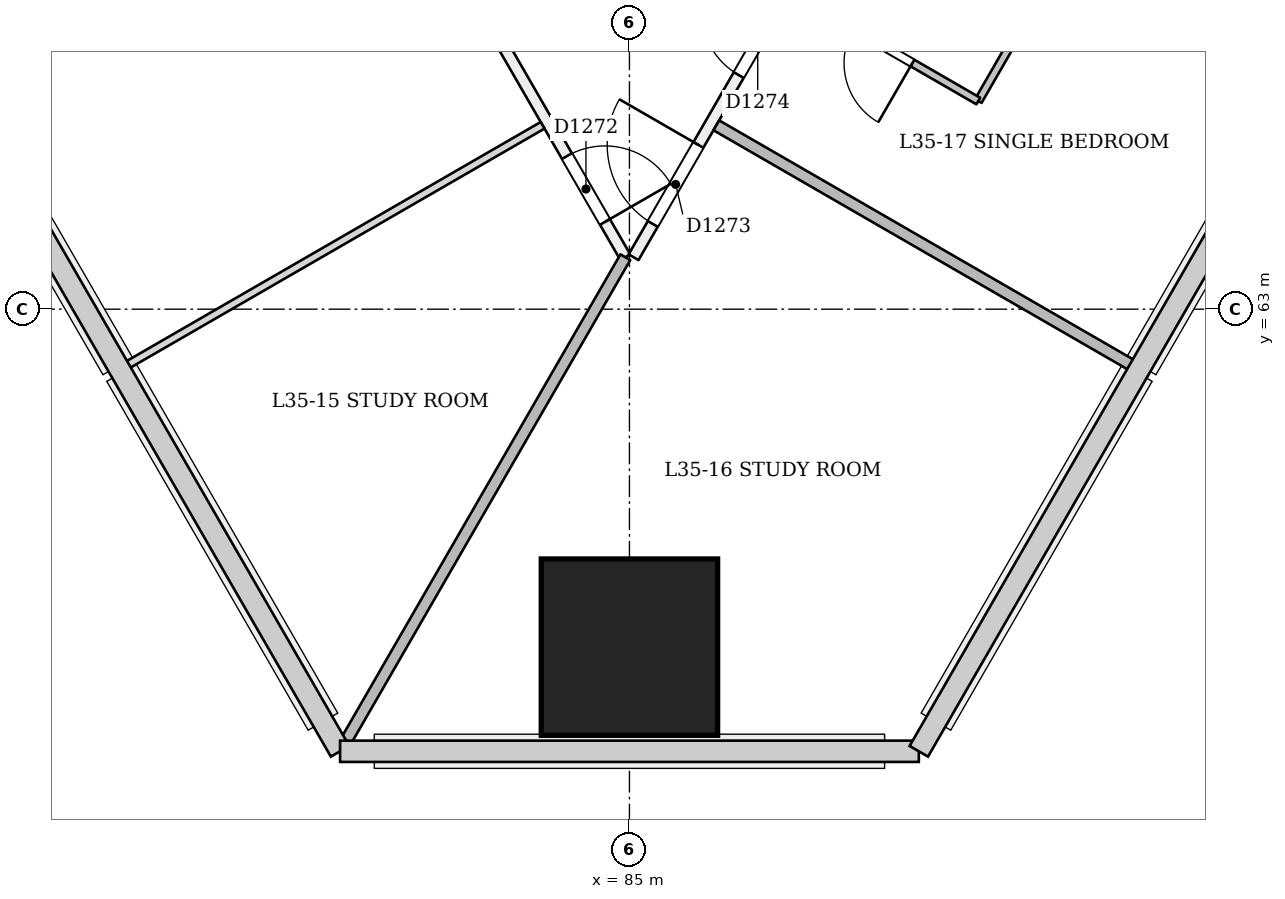
"""IFC4 building model, lengths in metres.
Left out: names, types, materials, properties, quantities, classifications, styles, units other than length and angle.
Written with IfcOpenShell. Run it as: python <this file> out.ifc"""

import sys

from ifc_helpers import new_model, si_unit, direction, frame, frame_2d, origin, origin_2d, place, context, subcontext, project, spatial, rectangle, extrude, element, fill, save


model = new_model("IFC4")
c1 = context("Model", 3, precision=1e-05, world=origin(), true_north=direction((0.0, 1.0)))
c2 = subcontext(c1, "Body", "Model", "MODEL_VIEW")
j1 = project(units=[si_unit("LENGTHUNIT", "METRE"), si_unit("PLANEANGLEUNIT", "RADIAN")], contexts=[c1])
p1 = place(None, origin())
s1 = spatial("IfcSite", under=j1, at=p1, CompositionType="ELEMENT")
p2 = place(p1, origin())
s2 = spatial("IfcBuilding", under=s1, at=p2, CompositionType="ELEMENT")
p3 = place(p2, frame((0.0, 0.0, 138.6)))
s3 = spatial("IfcBuildingStorey", under=s2, at=p3, CompositionType="ELEMENT", Elevation=138.6)
p4 = place(p3, frame((85.0, 58.484, 0.0), z_axis=(0.0, 0.058360852261, 0.998295552892), x_axis=(-1.0, 0.0, 0.0)))
e1 = element("IfcColumn", 1, at=p4, inside=s3, PredefinedType="COLUMN", context=c2, shape_type="SweptSolid", body=[
    extrude(rectangle(XDim=2.32, YDim=2.32, at=origin_2d()), origin(), (0.0, 0.0, 1.0), 3.606),
])
p5 = place(p3, frame((64.899, 98.406, 0.0), z_axis=(0.0, 0.0, 1.0), x_axis=(0.499995137693, -0.86602821102, 0.0)))
e2 = element("IfcWall", 2, at=p5, inside=s3, PredefinedType="PARTITIONING", context=c2, shape_type="SweptSolid", body=[
    extrude(rectangle(XDim=40.094, YDim=0.15, at=frame_2d((20.047, 0.0))), origin(), (0.0, 0.0, 1.0), 2.75),
])
p6 = place(p5, frame((0.2, 0.0, 0.0)))
e3 = element("IfcOpeningElement", 3, at=p6, cuts=e2, PredefinedType="OPENING", context=c2, shape_type="SweptSolid", body=[
    extrude(rectangle(XDim=1.2, YDim=2.1, at=frame_2d((0.6, 1.05))), frame((0.0, 0.085, 0.0), z_axis=(0.0, -1.0, 0.0), x_axis=(1.0, 0.0, 0.0)), (0.0, 0.0, 1.0), 0.171),
])
p7 = place(p5, frame((9.442, 0.0, 0.0)))
e4 = element("IfcOpeningElement", 4, at=p7, cuts=e2, PredefinedType="OPENING", context=c2, shape_type="SweptSolid", body=[
    extrude(rectangle(XDim=1.0, YDim=2.1, at=frame_2d((0.5, 1.05))), frame((0.0, 0.085, 0.0), z_axis=(0.0, -1.0, 0.0), x_axis=(1.0, 0.0, 0.0)), (0.0, 0.0, 1.0), 0.171),
])
p8 = place(p5, frame((11.652, 0.0, 0.0)))
e5 = element("IfcOpeningElement", 5, at=p8, cuts=e2, PredefinedType="OPENING", context=c2, shape_type="SweptSolid", body=[
    extrude(rectangle(XDim=1.0, YDim=2.1, at=frame_2d((0.5, 1.05))), frame((0.0, 0.085, 0.0), z_axis=(0.0, -1.0, 0.0), x_axis=(1.0, 0.0, 0.0)), (0.0, 0.0, 1.0), 0.171),
])
p9 = place(p5, frame((19.447, 0.0, 0.0)))
e6 = element("IfcOpeningElement", 6, at=p9, cuts=e2, PredefinedType="OPENING", context=c2, shape_type="SweptSolid", body=[
    extrude(rectangle(XDim=1.2, YDim=2.1, at=frame_2d((0.6, 1.05))), frame((0.0, 0.085, 0.0), z_axis=(0.0, -1.0, 0.0), x_axis=(1.0, 0.0, 0.0)), (0.0, 0.0, 1.0), 0.171),
])
p10 = place(p5, frame((27.327, 0.0, 0.0)))
e7 = element("IfcOpeningElement", 7, at=p10, cuts=e2, PredefinedType="OPENING", context=c2, shape_type="SweptSolid", body=[
    extrude(rectangle(XDim=1.0, YDim=2.1, at=frame_2d((0.5, 1.05))), frame((0.0, 0.085, 0.0), z_axis=(0.0, -1.0, 0.0), x_axis=(1.0, 0.0, 0.0)), (0.0, 0.0, 1.0), 0.171),
])
p11 = place(p5, frame((31.847, 0.0, 0.0)))
e8 = element("IfcOpeningElement", 8, at=p11, cuts=e2, PredefinedType="OPENING", context=c2, shape_type="SweptSolid", body=[
    extrude(rectangle(XDim=1.2, YDim=2.1, at=frame_2d((0.6, 1.05))), frame((0.0, 0.085, 0.0), z_axis=(0.0, -1.0, 0.0), x_axis=(1.0, 0.0, 0.0)), (0.0, 0.0, 1.0), 0.171),
])
p12 = place(p5, frame((38.558, 0.0, 0.0)))
e9 = element("IfcOpeningElement", 9, at=p12, cuts=e2, PredefinedType="OPENING", context=c2, shape_type="SweptSolid", body=[
    extrude(rectangle(XDim=1.0, YDim=2.1, at=frame_2d((0.5, 1.05))), frame((0.0, 0.085, 0.0), z_axis=(0.0, -1.0, 0.0), x_axis=(1.0, 0.0, 0.0)), (0.0, 0.0, 1.0), 0.171),
])
p13 = place(p3, frame((85.054, 63.684, 0.0), z_axis=(0.0, 0.0, 1.0), x_axis=(0.499999704591, 0.866025574339, 0.0)))
e10 = element("IfcWall", 10, at=p13, inside=s3, PredefinedType="PARTITIONING", context=c2, shape_type="SweptSolid", body=[
    extrude(rectangle(XDim=40.094, YDim=0.15, at=frame_2d((20.047, 0.0))), origin(), (0.0, 0.0, 1.0), 2.75),
])
p14 = place(p13, frame((0.506, 0.0, 0.0)))
e11 = element("IfcOpeningElement", 11, at=p14, cuts=e10, PredefinedType="OPENING", context=c2, shape_type="SweptSolid", body=[
    extrude(rectangle(XDim=1.2, YDim=2.1, at=frame_2d((0.6, 1.05))), frame((0.0, 0.085, 0.0), z_axis=(0.0, -1.0, 0.0), x_axis=(1.0, 0.0, 0.0)), (0.0, 0.0, 1.0), 0.171),
])
p15 = place(p13, frame((2.767, 0.0, 0.0)))
e12 = element("IfcOpeningElement", 12, at=p15, cuts=e10, PredefinedType="OPENING", context=c2, shape_type="SweptSolid", body=[
    extrude(rectangle(XDim=1.0, YDim=2.1, at=frame_2d((0.5, 1.05))), frame((0.0, 0.085, 0.0), z_axis=(0.0, -1.0, 0.0), x_axis=(1.0, 0.0, 0.0)), (0.0, 0.0, 1.0), 0.171),
])
p16 = place(p13, frame((8.297, 0.0, 0.0)))
e13 = element("IfcOpeningElement", 13, at=p16, cuts=e10, PredefinedType="OPENING", context=c2, shape_type="SweptSolid", body=[
    extrude(rectangle(XDim=1.0, YDim=2.1, at=frame_2d((0.5, 1.05))), frame((0.0, 0.085, 0.0), z_axis=(0.0, -1.0, 0.0), x_axis=(1.0, 0.0, 0.0)), (0.0, 0.0, 1.0), 0.171),
])
p17 = place(p13, frame((11.652, 0.0, 0.0)))
e14 = element("IfcOpeningElement", 14, at=p17, cuts=e10, PredefinedType="OPENING", context=c2, shape_type="SweptSolid", body=[
    extrude(rectangle(XDim=1.0, YDim=2.1, at=frame_2d((0.5, 1.05))), frame((0.0, 0.085, 0.0), z_axis=(0.0, -1.0, 0.0), x_axis=(1.0, 0.0, 0.0)), (0.0, 0.0, 1.0), 0.171),
])
p18 = place(p13, frame((18.327, 0.0, 0.0)))
e15 = element("IfcOpeningElement", 15, at=p18, cuts=e10, PredefinedType="OPENING", context=c2, shape_type="SweptSolid", body=[
    extrude(rectangle(XDim=1.0, YDim=2.1, at=frame_2d((0.5, 1.05))), frame((0.0, 0.085, 0.0), z_axis=(0.0, -1.0, 0.0), x_axis=(1.0, 0.0, 0.0)), (0.0, 0.0, 1.0), 0.171),
])
p19 = place(p13, frame((20.767, 0.0, 0.0)))
e16 = element("IfcOpeningElement", 16, at=p19, cuts=e10, PredefinedType="OPENING", context=c2, shape_type="SweptSolid", body=[
    extrude(rectangle(XDim=1.0, YDim=2.1, at=frame_2d((0.5, 1.05))), frame((0.0, 0.085, 0.0), z_axis=(0.0, -1.0, 0.0), x_axis=(1.0, 0.0, 0.0)), (0.0, 0.0, 1.0), 0.171),
])
p20 = place(p13, frame((26.297, 0.0, 0.0)))
e17 = element("IfcOpeningElement", 17, at=p20, cuts=e10, PredefinedType="OPENING", context=c2, shape_type="SweptSolid", body=[
    extrude(rectangle(XDim=1.0, YDim=2.1, at=frame_2d((0.5, 1.05))), frame((0.0, 0.085, 0.0), z_axis=(0.0, -1.0, 0.0), x_axis=(1.0, 0.0, 0.0)), (0.0, 0.0, 1.0), 0.171),
])
p21 = place(p13, frame((31.847, 0.0, 0.0)))
e18 = element("IfcOpeningElement", 18, at=p21, cuts=e10, PredefinedType="OPENING", context=c2, shape_type="SweptSolid", body=[
    extrude(rectangle(XDim=1.2, YDim=2.1, at=frame_2d((0.6, 1.05))), frame((0.0, 0.085, 0.0), z_axis=(0.0, -1.0, 0.0), x_axis=(1.0, 0.0, 0.0)), (0.0, 0.0, 1.0), 0.171),
])
p22 = place(p13, frame((38.694, 0.0, 0.0)))
e19 = element("IfcOpeningElement", 19, at=p22, cuts=e10, PredefinedType="OPENING", context=c2, shape_type="SweptSolid", body=[
    extrude(rectangle(XDim=1.2, YDim=2.1, at=frame_2d((0.6, 1.05))), frame((0.0, 0.085, 0.0), z_axis=(0.0, -1.0, 0.0), x_axis=(1.0, 0.0, 0.0)), (0.0, 0.0, 1.0), 0.171),
])
p23 = place(p3, frame((78.362, 62.246, 0.0), z_axis=(0.0, 0.0, 1.0), x_axis=(0.866025401434, 0.500000004071, 0.0)))
e20 = element("IfcWall", 20, at=p23, inside=s3, PredefinedType="PARTITIONING", context=c2, shape_type="SweptSolid", body=[
    extrude(rectangle(XDim=6.345, YDim=0.1, at=frame_2d((3.173, 0.0))), origin(), (0.0, 0.0, 1.0), 2.65),
])
p24 = place(p3, frame((81.236, 57.258, 0.0), z_axis=(0.0, 0.0, 1.0), x_axis=(0.500007295633, 0.866021191608, 0.0)))
e21 = element("IfcWall", 21, at=p24, inside=s3, PredefinedType="PARTITIONING", context=c2, shape_type="SweptSolid", body=[
    extrude(rectangle(XDim=7.419, YDim=0.15, at=frame_2d((3.71, 0.0))), origin(), (0.0, 0.0, 1.0), 2.65),
])
p25 = place(p3, frame((91.638, 62.246, 0.0), z_axis=(0.0, 0.0, 1.0), x_axis=(-0.866025401434, 0.500000004071, 0.0)))
e22 = element("IfcWall", 22, at=p25, inside=s3, PredefinedType="PARTITIONING", context=c2, shape_type="SweptSolid", body=[
    extrude(rectangle(XDim=6.345, YDim=0.15, at=frame_2d((3.173, 0.0))), origin(), (0.0, 0.0, 1.0), 2.65),
])
p26 = place(p3, frame((90.802, 67.839, 0.0), z_axis=(0.0, 0.0, 1.0), x_axis=(-0.500047793048, -0.865997808697, 0.0)))
e23 = element("IfcWall", 23, at=p26, inside=s3, PredefinedType="PARTITIONING", context=c2, shape_type="SweptSolid", body=[
    extrude(rectangle(XDim=2.425, YDim=0.1, at=frame_2d((1.212, 0.0))), origin(), (0.0, 0.0, 1.0), 2.75),
])
p27 = place(p3, frame((89.589, 65.739, 0.0), z_axis=(0.0, 0.0, 1.0), x_axis=(-0.866011447264, 0.500024172624, 0.0)))
e24 = element("IfcWall", 24, at=p27, inside=s3, PredefinedType="PARTITIONING", context=c2, shape_type="SweptSolid", body=[
    extrude(rectangle(XDim=2.825, YDim=0.1, at=frame_2d((1.413, 0.0))), origin(), (0.0, 0.0, 1.0), 3.15),
])
p28 = place(p27, frame((1.0, 0.0, 0.0)))
e25 = element("IfcOpeningElement", 25, at=p28, cuts=e24, PredefinedType="OPENING", context=c2, shape_type="SweptSolid", body=[
    extrude(rectangle(XDim=0.9, YDim=2.1, at=frame_2d((0.45, 1.05))), frame((0.0, 0.061, 0.0), z_axis=(0.0, -1.0, 0.0), x_axis=(1.0, 0.0, 0.0)), (0.0, 0.0, 1.0), 0.121),
])
p29 = place(p3, frame((93.87, 66.154, 0.0), z_axis=(0.0, 0.0, 1.0), x_axis=(-0.866036599697, 0.499980607609, 0.0)))
e26 = element("IfcWall", 26, at=p29, inside=s3, PredefinedType="PARTITIONING", context=c2, shape_type="SweptSolid", body=[
    extrude(rectangle(XDim=3.52, YDim=0.15, at=frame_2d((1.76, 0.0))), origin(), (0.0, 0.0, 1.0), 2.65),
])
p30 = place(p12, origin())
e27 = element("IfcDoor", 27, at=p30, inside=s3, OperationType="SINGLE_SWING_RIGHT", PredefinedType="NOTDEFINED", context=c2, shape_type="SweptSolid", body=[
    extrude(rectangle(XDim=1.0, YDim=2.1, at=frame_2d((0.5, 1.05))), frame((0.0, 0.025, 0.0), z_axis=(0.0, -1.0, 0.0), x_axis=(1.0, 0.0, 0.0)), (0.0, 0.0, 1.0), 0.05),
])
fill(e9, e27)
p31 = place(p14, origin())
e28 = element("IfcDoor", 28, at=p31, inside=s3, OperationType="SINGLE_SWING_RIGHT", PredefinedType="NOTDEFINED", context=c2, shape_type="SweptSolid", body=[
    extrude(rectangle(XDim=1.2, YDim=2.1, at=frame_2d((0.6, 1.05))), frame((0.0, 0.025, 0.0), z_axis=(0.0, -1.0, 0.0), x_axis=(1.0, 0.0, 0.0)), (0.0, 0.0, 1.0), 0.05),
])
fill(e11, e28)
p32 = place(p15, origin())
e29 = element("IfcDoor", 29, at=p32, inside=s3, OperationType="SINGLE_SWING_RIGHT", PredefinedType="NOTDEFINED", context=c2, shape_type="SweptSolid", body=[
    extrude(rectangle(XDim=1.0, YDim=2.1, at=frame_2d((0.5, 1.05))), frame((0.0, 0.025, 0.0), z_axis=(0.0, -1.0, 0.0), x_axis=(1.0, 0.0, 0.0)), (0.0, 0.0, 1.0), 0.05),
])
fill(e12, e29)
p33 = place(p28, origin())
e30 = element("IfcDoor", 30, at=p33, inside=s3, OperationType="SINGLE_SWING_LEFT", PredefinedType="NOTDEFINED", context=c2, shape_type="SweptSolid", body=[
    extrude(rectangle(XDim=0.9, YDim=2.1, at=frame_2d((0.45, 1.05))), frame((0.0, 0.025, 0.0), z_axis=(0.0, -1.0, 0.0), x_axis=(1.0, 0.0, 0.0)), (0.0, 0.0, 1.0), 0.05),
])
fill(e25, e30)
save(model, sys.argv[1])
